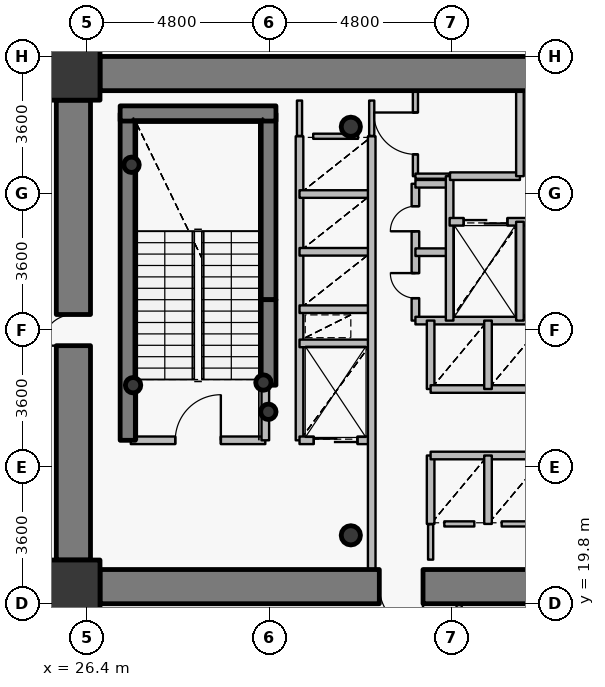
"""IFC4 building model, lengths in metres.
Left out: names, types, materials, properties, quantities, classifications, styles, units other than length and angle.
Written with IfcOpenShell. Run it as: python <this file> out.ifc"""

import sys

from ifc_helpers import new_model, si_unit, direction, frame, frame_2d, origin, origin_2d, place, context, subcontext, project, spatial, rectangle, hollow_circle, extrude, source, transform, mapped, element, fill, save


model = new_model("IFC4")
c1 = context("Model", 3, precision=1e-05, world=origin(), true_north=direction((0.0, 1.0)))
c2 = subcontext(c1, "Body", "Model", "MODEL_VIEW")
j1 = project(units=[si_unit("LENGTHUNIT", "METRE"), si_unit("PLANEANGLEUNIT", "RADIAN")], contexts=[c1])
p1 = place(None, origin())
s1 = spatial("IfcSite", under=j1, at=p1, CompositionType="ELEMENT")
p2 = place(p1, origin())
s2 = spatial("IfcBuilding", under=s1, at=p2, CompositionType="ELEMENT")
p3 = place(p2, frame((0.0, 0.0, 6.0)))
s3 = spatial("IfcBuildingStorey", under=s2, at=p3, CompositionType="ELEMENT", Elevation=6.0)
for number, where, z_axis, x_axis in (
    (1, (26.05, 20.25, 0.0), (0.0, 0.0, 1.0), (1.0, 0.0, 0.0)),
    (2, (26.05, 33.75, 0.0), (0.0, 0.0, 1.0), (1.0, 0.0, 0.0)),
):
    element("IfcColumn", number, at=place(p3, frame(where, z_axis=z_axis, x_axis=x_axis)), inside=s3, PredefinedType="COLUMN", context=c2, shape_type="SweptSolid", body=[
        extrude(rectangle(XDim=1.4, YDim=1.4, at=origin_2d()), origin(), (0.0, 0.0, 1.0), 4.2),
    ])
for number, where, z_axis, x_axis in (
    (3, (33.35, 21.6, 0.0), (0.0, 0.0, 1.0), (1.0, 0.0, 0.0)),
    (4, (33.35, 32.35, 0.0), (0.0, 0.0, 1.0), (1.0, 0.0, 0.0)),
):
    element("IfcColumn", number, at=place(p3, frame(where, z_axis=z_axis, x_axis=x_axis)), inside=s3, PredefinedType="COLUMN", context=c2, shape_type="SweptSolid", body=[
        extrude(hollow_circle(Radius=0.254, WallThickness=0.02, at=origin_2d()), origin(), (0.0, 0.0, 1.0), 4.2),
    ])
p4 = place(p3, frame((27.48, 24.1, 0.0), z_axis=(0.0, 0.0, 1.0), x_axis=(0.0, 1.0, 0.0)))
e5 = element("IfcWall", 5, at=p4, inside=s3, PredefinedType="SHEAR", context=c2, shape_type="SweptSolid", body=[
    extrude(rectangle(XDim=8.6, YDim=0.4, at=frame_2d((4.3, 0.0))), origin(), (0.0, 0.0, 1.0), 4.2),
])
p5 = place(p3, frame((31.18, 27.8, 0.0), z_axis=(0.0, 0.0, 1.0), x_axis=(0.0, 1.0, 0.0)))
e6 = element("IfcWall", 6, at=p5, inside=s3, PredefinedType="SHEAR", context=c2, shape_type="SweptSolid", body=[
    extrude(rectangle(XDim=4.9, YDim=0.4, at=frame_2d((2.45, 0.0))), origin(), (0.0, 0.0, 1.0), 4.2),
])
p6 = place(p3, frame((27.28, 32.7, 0.0), z_axis=(0.0, 0.0, 1.0), x_axis=(1.0, 0.0, 0.0)))
e7 = element("IfcWall", 7, at=p6, inside=s3, PredefinedType="SHEAR", context=c2, shape_type="SweptSolid", body=[
    extrude(rectangle(XDim=4.1, YDim=0.4, at=frame_2d((2.05, 0.0))), origin(), (0.0, 0.0, 1.0), 4.2),
])
for number, where, z_axis, x_axis in (
    (8, (27.58, 31.35, 0.0), (0.0, 0.0, 1.0), (1.0, 0.0, 0.0)),
    (9, (31.05, 25.62, 0.0), (0.0, 0.0, 1.0), (1.0, 0.0, 0.0)),
    (10, (31.18, 24.85, 0.0), (0.0, 0.0, 1.0), (1.0, 0.0, 0.0)),
    (11, (27.62, 25.55, 0.0), (0.0, 0.0, 1.0), (1.0, 0.0, 0.0)),
):
    element("IfcColumn", number, at=place(p3, frame(where, z_axis=z_axis, x_axis=x_axis)), inside=s3, PredefinedType="COLUMN", context=c2, shape_type="SweptSolid", body=[
        extrude(hollow_circle(Radius=0.203, WallThickness=0.016, at=origin_2d()), origin(), (0.0, 0.0, 1.0), 4.2),
    ])
p7 = place(p3, frame((26.75, 33.75, 0.0), z_axis=(0.0, 0.0, 1.0), x_axis=(1.0, 0.0, 0.0)))
e12 = element("IfcWall", 12, at=p7, inside=s3, PredefinedType="SHEAR", context=c2, shape_type="SweptSolid", body=[
    extrude(rectangle(XDim=18.5, YDim=0.9, at=frame_2d((9.25, 0.0))), origin(), (0.0, 0.0, 1.0), 3.35),
])
p8 = place(p3, frame((45.25, 20.25, 0.0), z_axis=(0.0, 0.0, 1.0), x_axis=(-1.0, 0.0, 0.0)))
e13 = element("IfcWall", 13, at=p8, inside=s3, PredefinedType="SHEAR", context=c2, shape_type="SweptSolid", body=[
    extrude(rectangle(XDim=18.5, YDim=0.9, at=frame_2d((9.25, 0.0))), origin(), (0.0, 0.0, 1.0), 3.35),
])
p9 = place(p8, frame((10.0, 0.0, 0.0)))
e14 = element("IfcOpeningElement", 14, at=p9, cuts=e13, PredefinedType="OPENING", context=c2, shape_type="SweptSolid", body=[
    extrude(rectangle(XDim=1.15, YDim=2.15, at=origin_2d()), frame((0.575, 0.46, 1.075), z_axis=(0.0, -1.0, 0.0), x_axis=(1.0, 0.0, 0.0)), (0.0, 0.0, 1.0), 0.92),
])
p10 = place(p3, frame((26.05, 20.95, 0.0), z_axis=(0.0, 0.0, 1.0), x_axis=(0.0, 1.0, 0.0)))
e15 = element("IfcWall", 15, at=p10, inside=s3, PredefinedType="SHEAR", context=c2, shape_type="SweptSolid", body=[
    extrude(rectangle(XDim=12.1, YDim=0.9, at=frame_2d((6.05, 0.0))), origin(), (0.0, 0.0, 1.0), 3.35),
])
p11 = place(p10, frame((5.64, 0.0, 0.0)))
e16 = element("IfcOpeningElement", 16, at=p11, cuts=e15, PredefinedType="OPENING", context=c2, shape_type="SweptSolid", body=[
    extrude(rectangle(XDim=0.82, YDim=2.1, at=origin_2d()), frame((0.41, 0.46, 1.05), z_axis=(0.0, -1.0, 0.0), x_axis=(1.0, 0.0, 0.0)), (0.0, 0.0, 1.0), 0.92),
])
p12 = place(p3, frame((31.18, 25.55, 0.0), z_axis=(0.0, 0.0, 1.0), x_axis=(0.0, 1.0, 0.0)))
e17 = element("IfcWall", 17, at=p12, inside=s3, PredefinedType="SHEAR", context=c2, shape_type="SweptSolid", body=[
    extrude(rectangle(XDim=2.25, YDim=0.4, at=frame_2d((1.125, 0.0))), origin(), (0.0, 0.0, 1.0), 3.5),
])
p13 = place(p3, frame((27.56, 24.1, 0.0), z_axis=(0.0, 0.0, 1.0), x_axis=(1.0, 0.0, 0.0)))
e18 = element("IfcWall", 18, at=p13, inside=s3, PredefinedType="PARTITIONING", context=c2, shape_type="SweptSolid", body=[
    extrude(rectangle(XDim=3.54, YDim=0.2, at=frame_2d((1.77, 0.0))), origin(), (0.0, 0.0, 1.0), 3.9),
])
p14 = place(p13, frame((1.17, 0.0, 0.0)))
e19 = element("IfcOpeningElement", 19, at=p14, cuts=e18, PredefinedType="OPENING", context=c2, shape_type="SweptSolid", body=[
    extrude(rectangle(XDim=1.2, YDim=2.15, at=origin_2d()), frame((0.6, 0.11, 1.075), z_axis=(0.0, -1.0, 0.0), x_axis=(1.0, 0.0, 0.0)), (0.0, 0.0, 1.0), 0.22),
])
p15 = place(p3, frame((31.1, 24.1, 0.0), z_axis=(0.0, 0.0, 1.0), x_axis=(0.0, 1.0, 0.0)))
e20 = element("IfcWall", 20, at=p15, inside=s3, PredefinedType="PARTITIONING", context=c2, shape_type="SweptSolid", body=[
    extrude(rectangle(XDim=1.44, YDim=0.2, at=frame_2d((0.72, 0.0))), origin(), (0.0, 0.0, 1.0), 3.9),
])
p16 = place(p3, frame((32.0, 24.1, 0.0), z_axis=(0.0, 0.0, 1.0), x_axis=(0.0, 1.0, 0.0)))
e21 = element("IfcWall", 21, at=p16, inside=s3, PredefinedType="PARTITIONING", context=c2, shape_type="SweptSolid", body=[
    extrude(rectangle(XDim=8.0, YDim=0.2, at=frame_2d((4.0, 0.0))), origin(), (0.0, 0.0, 1.0), 3.9),
])
p17 = place(p3, frame((32.0, 24.1, 0.0), z_axis=(0.0, 0.0, 1.0), x_axis=(1.0, 0.0, 0.0)))
e22 = element("IfcWall", 22, at=p17, inside=s3, PredefinedType="PARTITIONING", context=c2, shape_type="SweptSolid", body=[
    extrude(rectangle(XDim=1.9, YDim=0.2, at=frame_2d((0.95, 0.0))), origin(), (0.0, 0.0, 1.0), 3.485),
])
p18 = place(p17, frame((0.375, 0.0, 0.0)))
e23 = element("IfcOpeningElement", 23, at=p18, cuts=e22, PredefinedType="OPENING", context=c2, shape_type="SweptSolid", body=[
    extrude(rectangle(XDim=1.15, YDim=2.15, at=origin_2d()), frame((0.575, 0.11, 1.075), z_axis=(0.0, -1.0, 0.0), x_axis=(1.0, 0.0, 0.0)), (0.0, 0.0, 1.0), 0.22),
])
for number, where, z_axis, x_axis in (
    (24, (32.0, 26.65, 0.0), (0.0, 0.0, 1.0), (1.0, 0.0, 0.0)),
    (25, (32.0, 27.55, 0.0), (0.0, 0.0, 1.0), (1.0, 0.0, 0.0)),
    (26, (32.0, 29.06, 0.0), (0.0, 0.0, 1.0), (1.0, 0.0, 0.0)),
    (27, (32.0, 30.58, 0.0), (0.0, 0.0, 1.0), (1.0, 0.0, 0.0)),
):
    element("IfcWall", number, at=place(p3, frame(where, z_axis=z_axis, x_axis=x_axis)), inside=s3, PredefinedType="PARTITIONING", context=c2, shape_type="SweptSolid", body=[
        extrude(rectangle(XDim=1.9, YDim=0.2, at=frame_2d((0.95, 0.0))), origin(), (0.0, 0.0, 1.0), 3.485),
    ])
p19 = place(p3, frame((33.9, 20.7, 0.0), z_axis=(0.0, 0.0, 1.0), x_axis=(0.0, 1.0, 0.0)))
e28 = element("IfcWall", 28, at=p19, inside=s3, PredefinedType="PARTITIONING", context=c2, shape_type="SweptSolid", body=[
    extrude(rectangle(XDim=11.4, YDim=0.2, at=frame_2d((5.7, 0.0))), origin(), (0.0, 0.0, 1.0), 3.485),
])
p20 = place(p3, frame((35.05, 27.25, 0.0), z_axis=(0.0, 0.0, 1.0), x_axis=(0.0, 1.0, 0.0)))
e29 = element("IfcWall", 29, at=p20, inside=s3, PredefinedType="PARTITIONING", context=c2, shape_type="SweptSolid", body=[
    extrude(rectangle(XDim=3.6, YDim=0.2, at=frame_2d((1.8, 0.0))), origin(), (0.0, 0.0, 1.0), 3.9),
])
p21 = place(p20, frame((0.59, 0.0, 0.0)))
e30 = element("IfcOpeningElement", 30, at=p21, cuts=e29, PredefinedType="OPENING", context=c2, shape_type="SweptSolid", body=[
    extrude(rectangle(XDim=0.66, YDim=2.05, at=origin_2d()), frame((0.33, 0.11, 1.025), z_axis=(0.0, -1.0, 0.0), x_axis=(1.0, 0.0, 0.0)), (0.0, 0.0, 1.0), 0.22),
])
p22 = place(p20, frame((2.35, 0.0, 0.0)))
e31 = element("IfcOpeningElement", 31, at=p22, cuts=e29, PredefinedType="OPENING", context=c2, shape_type="SweptSolid", body=[
    extrude(rectangle(XDim=0.66, YDim=2.05, at=origin_2d()), frame((0.33, 0.11, 1.025), z_axis=(0.0, -1.0, 0.0), x_axis=(1.0, 0.0, 0.0)), (0.0, 0.0, 1.0), 0.22),
])
p23 = place(p3, frame((35.05, 27.25, 0.0), z_axis=(0.0, 0.0, 1.0), x_axis=(1.0, 0.0, 0.0)))
e32 = element("IfcWall", 32, at=p23, inside=s3, PredefinedType="PARTITIONING", context=c2, shape_type="SweptSolid", body=[
    extrude(rectangle(XDim=4.95, YDim=0.2, at=frame_2d((2.475, 0.0))), origin(), (0.0, 0.0, 1.0), 3.485),
])
for number, where, z_axis, x_axis in (
    (33, (35.05, 29.05, 0.0), (0.0, 0.0, 1.0), (1.0, 0.0, 0.0)),
    (34, (35.05, 30.85, 0.0), (0.0, 0.0, 1.0), (1.0, 0.0, 0.0)),
):
    element("IfcWall", number, at=place(p3, frame(where, z_axis=z_axis, x_axis=x_axis)), inside=s3, PredefinedType="PARTITIONING", context=c2, shape_type="SweptSolid", body=[
        extrude(rectangle(XDim=0.9, YDim=0.2, at=frame_2d((0.45, 0.0))), origin(), (0.0, 0.0, 1.0), 3.9),
    ])
p24 = place(p3, frame((35.05, 31.05, 0.0), z_axis=(0.0, 0.0, 1.0), x_axis=(0.0, 1.0, 0.0)))
e35 = element("IfcWall", 35, at=p24, inside=s3, PredefinedType="PARTITIONING", context=c2, shape_type="SweptSolid", body=[
    extrude(rectangle(XDim=2.25, YDim=0.135, at=frame_2d((1.125, 0.0))), origin(), (0.0, 0.0, 1.0), 3.485),
])
p25 = place(p24, frame((0.575, 0.0, 0.0)))
e36 = element("IfcOpeningElement", 36, at=p25, cuts=e35, PredefinedType="OPENING", context=c2, shape_type="SweptSolid", body=[
    extrude(rectangle(XDim=1.1, YDim=2.15, at=origin_2d()), frame((0.55, 0.078, 1.075), z_axis=(0.0, -1.0, 0.0), x_axis=(1.0, 0.0, 0.0)), (0.0, 0.0, 1.0), 0.155),
])
p26 = place(p3, frame((35.05, 31.05, 0.0), z_axis=(0.0, 0.0, 1.0), x_axis=(1.0, 0.0, 0.0)))
e37 = element("IfcWall", 37, at=p26, inside=s3, PredefinedType="PARTITIONING", context=c2, shape_type="SweptSolid", body=[
    extrude(rectangle(XDim=0.9, YDim=0.135, at=frame_2d((0.45, 0.0))), origin(), (0.0, 0.0, 1.0), 3.9),
])
p27 = place(p3, frame((35.45, 21.9, 0.0), z_axis=(0.0, 0.0, 1.0), x_axis=(0.0, 1.0, 0.0)))
e38 = element("IfcWall", 38, at=p27, inside=s3, PredefinedType="PARTITIONING", context=c2, shape_type="SweptSolid", body=[
    extrude(rectangle(XDim=1.8, YDim=0.2, at=frame_2d((0.9, 0.0))), origin(), (0.0, 0.0, 1.0), 3.9),
])
p28 = place(p3, frame((35.45, 23.7, 0.0), z_axis=(0.0, 0.0, 1.0), x_axis=(1.0, 0.0, 0.0)))
e39 = element("IfcWall", 39, at=p28, inside=s3, PredefinedType="PARTITIONING", context=c2, shape_type="SweptSolid", body=[
    extrude(rectangle(XDim=4.55, YDim=0.2, at=frame_2d((2.275, 0.0))), origin(), (0.0, 0.0, 1.0), 3.485),
])
p29 = place(p3, frame((35.45, 25.45, 0.0), z_axis=(0.0, 0.0, 1.0), x_axis=(0.0, 1.0, 0.0)))
e40 = element("IfcWall", 40, at=p29, inside=s3, PredefinedType="PARTITIONING", context=c2, shape_type="SweptSolid", body=[
    extrude(rectangle(XDim=1.8, YDim=0.2, at=frame_2d((0.9, 0.0))), origin(), (0.0, 0.0, 1.0), 3.9),
])
p30 = place(p3, frame((35.45, 25.45, 0.0), z_axis=(0.0, 0.0, 1.0), x_axis=(1.0, 0.0, 0.0)))
e41 = element("IfcWall", 41, at=p30, inside=s3, PredefinedType="PARTITIONING", context=c2, shape_type="SweptSolid", body=[
    extrude(rectangle(XDim=4.55, YDim=0.2, at=frame_2d((2.275, 0.0))), origin(), (0.0, 0.0, 1.0), 3.485),
])
p31 = place(p3, frame((35.95, 27.25, 0.0), z_axis=(0.0, 0.0, 1.0), x_axis=(0.0, 1.0, 0.0)))
e42 = element("IfcWall", 42, at=p31, inside=s3, PredefinedType="PARTITIONING", context=c2, shape_type="SweptSolid", body=[
    extrude(rectangle(XDim=3.8, YDim=0.2, at=frame_2d((1.9, 0.0))), origin(), (0.0, 0.0, 1.0), 3.9),
])
p32 = place(p3, frame((35.95, 29.85, 0.0), z_axis=(0.0, 0.0, 1.0), x_axis=(1.0, 0.0, 0.0)))
e43 = element("IfcWall", 43, at=p32, inside=s3, PredefinedType="PARTITIONING", context=c2, shape_type="SweptSolid", body=[
    extrude(rectangle(XDim=8.49, YDim=0.2, at=frame_2d((4.245, 0.0))), origin(), (0.0, 0.0, 1.0), 3.485),
])
p33 = place(p32, frame((6.1, 0.0, 0.0)))
e44 = element("IfcOpeningElement", 44, at=p33, cuts=e43, PredefinedType="OPENING", context=c2, shape_type="SweptSolid", body=[
    extrude(rectangle(XDim=1.2, YDim=2.15, at=origin_2d()), frame((0.6, 0.11, 1.075), z_axis=(0.0, -1.0, 0.0), x_axis=(1.0, 0.0, 0.0)), (0.0, 0.0, 1.0), 0.22),
])
p34 = place(p32, frame((0.37, 0.0, 0.0)))
e45 = element("IfcOpeningElement", 45, at=p34, cuts=e43, PredefinedType="OPENING", context=c2, shape_type="SweptSolid", body=[
    extrude(rectangle(XDim=1.15, YDim=2.15, at=origin_2d()), frame((0.575, 0.11, 1.075), z_axis=(0.0, -1.0, 0.0), x_axis=(1.0, 0.0, 0.0)), (0.0, 0.0, 1.0), 0.22),
])
p35 = place(p32, frame((2.425, 0.0, 0.0)))
e46 = element("IfcOpeningElement", 46, at=p35, cuts=e43, PredefinedType="OPENING", context=c2, shape_type="SweptSolid", body=[
    extrude(rectangle(XDim=1.05, YDim=2.15, at=origin_2d()), frame((0.525, 0.11, 1.075), z_axis=(0.0, -1.0, 0.0), x_axis=(1.0, 0.0, 0.0)), (0.0, 0.0, 1.0), 0.22),
])
p36 = place(p3, frame((35.96, 31.05, 0.0), z_axis=(0.0, 0.0, 1.0), x_axis=(1.0, 0.0, 0.0)))
e47 = element("IfcWall", 47, at=p36, inside=s3, PredefinedType="PARTITIONING", context=c2, shape_type="SweptSolid", body=[
    extrude(rectangle(XDim=1.84, YDim=0.2, at=frame_2d((0.92, 0.0))), origin(), (0.0, 0.0, 1.0), 3.9),
])
p37 = place(p3, frame((36.2, 17.9, 0.0), z_axis=(0.0, 0.0, 1.0), x_axis=(0.0, 1.0, 0.0)))
e48 = element("IfcWall", 48, at=p37, inside=s3, PredefinedType="PARTITIONING", context=c2, shape_type="SweptSolid", body=[
    extrude(rectangle(XDim=1.9, YDim=0.135, at=frame_2d((0.95, 0.0))), origin(), (0.0, 0.0, 1.0), 3.085),
])
for number, where, z_axis, x_axis in (
    (49, (36.96, 21.9, 0.0), (0.0, 0.0, 1.0), (0.0, 1.0, 0.0)),
    (50, (36.96, 25.45, 0.0), (0.0, 0.0, 1.0), (0.0, 1.0, 0.0)),
):
    element("IfcWall", number, at=place(p3, frame(where, z_axis=z_axis, x_axis=x_axis)), inside=s3, PredefinedType="PARTITIONING", context=c2, shape_type="SweptSolid", body=[
        extrude(rectangle(XDim=1.8, YDim=0.2, at=frame_2d((0.9, 0.0))), origin(), (0.0, 0.0, 1.0), 3.9),
    ])
p38 = place(p3, frame((37.8, 27.25, 0.0), z_axis=(0.0, 0.0, 1.0), x_axis=(0.0, 1.0, 0.0)))
e51 = element("IfcWall", 51, at=p38, inside=s3, PredefinedType="PARTITIONING", context=c2, shape_type="SweptSolid", body=[
    extrude(rectangle(XDim=2.6, YDim=0.2, at=frame_2d((1.3, 0.0))), origin(), (0.0, 0.0, 1.0), 3.9),
])
p39 = place(p3, frame((37.8, 31.05, 0.0), z_axis=(0.0, 0.0, 1.0), x_axis=(0.0, 1.0, 0.0)))
e52 = element("IfcWall", 52, at=p39, inside=s3, PredefinedType="PARTITIONING", context=c2, shape_type="SweptSolid", body=[
    extrude(rectangle(XDim=2.25, YDim=0.2, at=frame_2d((1.125, 0.0))), origin(), (0.0, 0.0, 1.0), 3.485),
])
p40 = place(p3, frame((36.6, 21.9, 0.0), z_axis=(0.0, 0.0, 1.0), x_axis=(-1.0, 0.0, 0.0)))
e53 = element("IfcWall", 53, at=p40, inside=s3, PredefinedType="PARTITIONING", context=c2, shape_type="SweptSolid", body=[
    extrude(rectangle(XDim=0.79, YDim=0.135, at=frame_2d((0.395, 0.0))), origin(), (0.0, 0.0, 1.0), 3.9),
])
p41 = place(p3, frame((38.12, 21.9, 0.0), z_axis=(0.0, 0.0, 1.0), x_axis=(-1.0, 0.0, 0.0)))
e54 = element("IfcWall", 54, at=p41, inside=s3, PredefinedType="PARTITIONING", context=c2, shape_type="SweptSolid", body=[
    extrude(rectangle(XDim=0.8, YDim=0.135, at=frame_2d((0.4, 0.0))), origin(), (0.0, 0.0, 1.0), 3.9),
])
p42 = place(p3, frame((32.36, 32.1, 0.0), z_axis=(0.0, 0.0, 1.0), x_axis=(1.0, 0.0, 0.0)))
e55 = element("IfcWall", 55, at=p42, inside=s3, PredefinedType="PARTITIONING", context=c2, shape_type="SweptSolid", body=[
    extrude(rectangle(XDim=1.18, YDim=0.135, at=frame_2d((0.59, 0.0))), origin(), (0.0, 0.0, 1.0), 3.485),
])
p43 = place(p3, frame((32.0, 33.04, 0.0), z_axis=(0.0, 0.0, 1.0), x_axis=(0.0, -1.0, 0.0)))
e56 = element("IfcWall", 56, at=p43, inside=s3, PredefinedType="PARTITIONING", context=c2, shape_type="SweptSolid", body=[
    extrude(rectangle(XDim=0.93, YDim=0.135, at=frame_2d((0.465, 0.0))), origin(), (0.0, 0.0, 1.0), 3.435),
])
for number, where, z_axis, x_axis in (
    (57, (35.45, 21.89, 0.0), (0.0, 0.0, 1.0), (0.0, -1.0, 0.0)),
    (58, (33.9, 32.11, 0.0), (0.0, 0.0, 1.0), (0.0, 1.0, 0.0)),
):
    element("IfcWall", number, at=place(p3, frame(where, z_axis=z_axis, x_axis=x_axis)), inside=s3, PredefinedType="PARTITIONING", context=c2, shape_type="SweptSolid", body=[
        extrude(rectangle(XDim=0.93, YDim=0.135, at=frame_2d((0.465, 0.0))), origin(), (0.0, 0.0, 1.0), 3.485),
    ])
p44 = place(p3, frame((25.95, 38.893, 0.0), z_axis=(0.0, 0.0, 1.0), x_axis=(0.0, -1.0, 0.0)))
e59 = element("IfcWall", 59, at=p44, inside=s3, PredefinedType="PARTITIONING", context=c2, shape_type="SweptSolid", body=[
    extrude(rectangle(XDim=4.693, YDim=0.135, at=frame_2d((2.346, 0.0))), origin(), (0.0, 0.0, 1.0), 3.085),
])
for number, where, z_axis, x_axis in (
    (60, (25.6, 34.2, 0.0), (0.0, 0.0, 1.0), (0.0, -1.0, 0.0)),
    (61, (25.6, 20.94, 0.0), (0.0, 0.0, 1.0), (0.0, -1.0, 0.0)),
):
    element("IfcWall", number, at=place(p3, frame(where, z_axis=z_axis, x_axis=x_axis)), inside=s3, PredefinedType="PARTITIONING", context=c2, shape_type="SweptSolid", body=[
        extrude(rectangle(XDim=1.14, YDim=0.135, at=frame_2d((0.57, 0.0))), origin(), (0.0, 0.0, 1.0), 3.9),
    ])
p45 = place(p3, frame((25.907, 19.8, 0.0), z_axis=(0.0, 0.0, 1.0), x_axis=(1.0, 0.0, 0.0)))
e62 = element("IfcWall", 62, at=p45, inside=s3, PredefinedType="PARTITIONING", context=c2, shape_type="SweptSolid", body=[
    extrude(rectangle(XDim=0.833, YDim=0.135, at=frame_2d((0.416, 0.0))), origin(), (0.0, 0.0, 1.0), 3.085),
])
m1 = source(origin(), c2, "Body", "SweptSolid", [
    extrude(rectangle(XDim=0.82, YDim=2.1, at=origin_2d()), frame((0.41, 0.025, 1.05), z_axis=(0.0, -1.0, 0.0), x_axis=(1.0, 0.0, 0.0)), (0.0, 0.0, 1.0), 0.05),
])
p46 = place(p11, origin())
e63 = element("IfcDoor", 63, at=p46, inside=s3, OperationType="SINGLE_SWING_LEFT", PredefinedType="DOOR", context=c2, shape_type="MappedRepresentation", body=[
    mapped(m1, transform((0.0, 0.0, 0.0), x_axis=(1.0, 0.0, 0.0), y_axis=(0.0, 1.0, 0.0), z_axis=(0.0, 0.0, 1.0), scale=1.0)),
])
fill(e16, e63)
m2 = source(origin(), c2, "Body", "SweptSolid", [
    extrude(rectangle(XDim=1.15, YDim=2.15, at=origin_2d()), frame((0.575, 0.025, 1.075), z_axis=(0.0, -1.0, 0.0), x_axis=(1.0, 0.0, 0.0)), (0.0, 0.0, 1.0), 0.05),
])
p47 = place(p9, origin())
e64 = element("IfcDoor", 64, at=p47, inside=s3, OperationType="SINGLE_SWING_LEFT", PredefinedType="DOOR", context=c2, shape_type="MappedRepresentation", body=[
    mapped(m2, transform((0.0, 0.0, 0.0), x_axis=(1.0, 0.0, 0.0), y_axis=(0.0, 1.0, 0.0), z_axis=(0.0, 0.0, 1.0), scale=1.0)),
])
fill(e14, e64)
m3 = source(origin(), c2, "Body", "SweptSolid", [
    extrude(rectangle(XDim=1.2, YDim=2.15, at=origin_2d()), frame((0.6, 0.025, 1.075), z_axis=(0.0, -1.0, 0.0), x_axis=(1.0, 0.0, 0.0)), (0.0, 0.0, 1.0), 0.05),
])
p48 = place(p14, origin())
e65 = element("IfcDoor", 65, at=p48, inside=s3, OperationType="SINGLE_SWING_RIGHT", PredefinedType="DOOR", context=c2, shape_type="MappedRepresentation", body=[
    mapped(m3, transform((0.0, 0.0, 0.0), x_axis=(1.0, 0.0, 0.0), y_axis=(0.0, 1.0, 0.0), z_axis=(0.0, 0.0, 1.0), scale=1.0)),
])
fill(e19, e65)
m4 = source(origin(), c2, "Body", "SweptSolid", [
    extrude(rectangle(XDim=1.15, YDim=2.15, at=origin_2d()), frame((0.575, 0.025, 1.075), z_axis=(0.0, -1.0, 0.0), x_axis=(1.0, 0.0, 0.0)), (0.0, 0.0, 1.0), 0.05),
])
p49 = place(p34, origin())
e66 = element("IfcDoor", 66, at=p49, inside=s3, OperationType="DOUBLE_DOOR_SLIDING", PredefinedType="USERDEFINED", context=c2, shape_type="MappedRepresentation", body=[
    mapped(m4, transform((0.0, 0.0, 0.0), x_axis=(1.0, 0.0, 0.0), y_axis=(0.0, 1.0, 0.0), z_axis=(0.0, 0.0, 1.0), scale=1.0)),
])
fill(e45, e66)
p50 = place(p18, origin())
e67 = element("IfcDoor", 67, at=p50, inside=s3, OperationType="DOUBLE_DOOR_SLIDING", PredefinedType="USERDEFINED", context=c2, shape_type="MappedRepresentation", body=[
    mapped(m4, transform((0.0, 0.0, 0.0), x_axis=(1.0, 0.0, 0.0), y_axis=(0.0, 1.0, 0.0), z_axis=(0.0, 0.0, 1.0), scale=1.0)),
])
fill(e23, e67)
m5 = source(origin(), c2, "Body", "SweptSolid", [
    extrude(rectangle(XDim=0.66, YDim=2.05, at=origin_2d()), frame((0.33, 0.025, 1.025), z_axis=(0.0, -1.0, 0.0), x_axis=(1.0, 0.0, 0.0)), (0.0, 0.0, 1.0), 0.05),
])
p51 = place(p21, origin())
e68 = element("IfcDoor", 68, at=p51, inside=s3, OperationType="SINGLE_SWING_RIGHT", PredefinedType="USERDEFINED", context=c2, shape_type="MappedRepresentation", body=[
    mapped(m5, transform((0.0, 0.0, 0.0), x_axis=(1.0, 0.0, 0.0), y_axis=(0.0, 1.0, 0.0), z_axis=(0.0, 0.0, 1.0), scale=1.0)),
])
fill(e30, e68)
p52 = place(p22, origin())
e69 = element("IfcDoor", 69, at=p52, inside=s3, OperationType="SINGLE_SWING_LEFT", PredefinedType="USERDEFINED", context=c2, shape_type="MappedRepresentation", body=[
    mapped(m5, transform((0.0, 0.0, 0.0), x_axis=(1.0, 0.0, 0.0), y_axis=(0.0, 1.0, 0.0), z_axis=(0.0, 0.0, 1.0), scale=1.0)),
])
fill(e31, e69)
m6 = source(origin(), c2, "Body", "SweptSolid", [
    extrude(rectangle(XDim=1.1, YDim=2.15, at=origin_2d()), frame((0.55, 0.025, 1.075), z_axis=(0.0, -1.0, 0.0), x_axis=(1.0, 0.0, 0.0)), (0.0, 0.0, 1.0), 0.05),
])
p53 = place(p25, origin())
e70 = element("IfcDoor", 70, at=p53, inside=s3, OperationType="SINGLE_SWING_RIGHT", PredefinedType="DOOR", context=c2, shape_type="MappedRepresentation", body=[
    mapped(m6, transform((0.0, 0.0, 0.0), x_axis=(1.0, 0.0, 0.0), y_axis=(0.0, 1.0, 0.0), z_axis=(0.0, 0.0, 1.0), scale=1.0)),
])
fill(e36, e70)
save(model, sys.argv[1])
